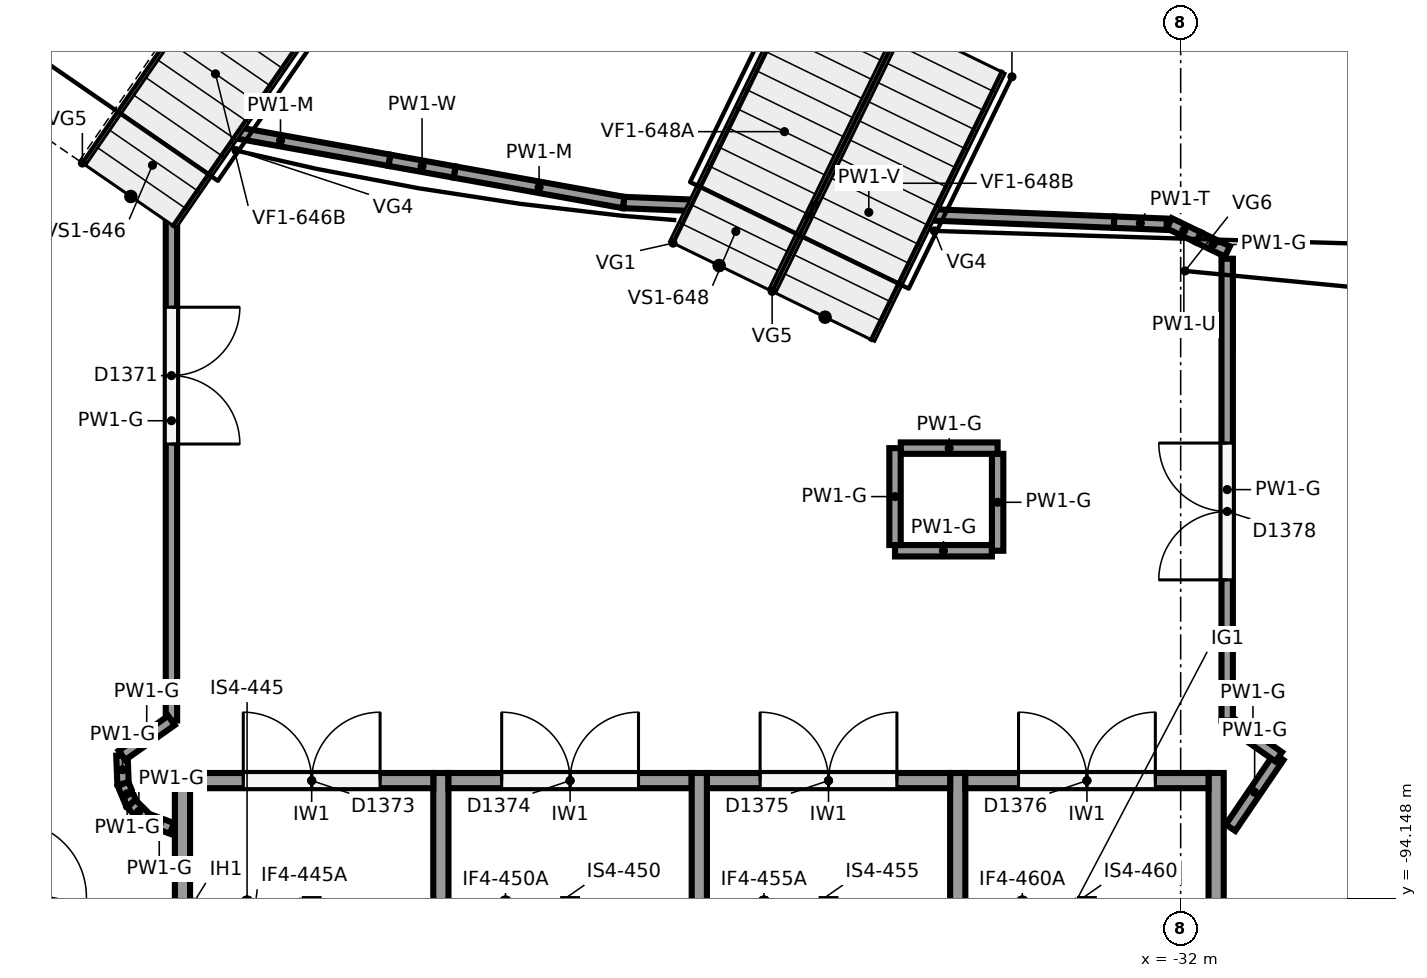
"""IFC4 building model, lengths in metres.
Left out: names, types, materials, properties, quantities, classifications, styles, units other than length and angle.
Written with IfcOpenShell. Run it as: python <this file> out.ifc"""

import sys

from ifc_helpers import new_model, si_unit, direction, frame, frame_2d, origin, origin_2d, place, context, subcontext, project, spatial, rectangle, circle, extrude, element, fill, save


model = new_model("IFC4")
c1 = context("Model", 3, precision=1e-05, world=origin(), true_north=direction((0.0, 1.0)))
c2 = subcontext(c1, "Body", "Model", "MODEL_VIEW")
j1 = project(units=[si_unit("LENGTHUNIT", "METRE"), si_unit("PLANEANGLEUNIT", "RADIAN")], contexts=[c1])
p1 = place(None, origin())
s1 = spatial("IfcSite", under=j1, at=p1, CompositionType="ELEMENT")
p2 = place(p1, origin())
s2 = spatial("IfcBuilding", under=s1, at=p2, CompositionType="ELEMENT")
p3 = place(p2, frame((0.0, 0.0, 18.0)))
s3 = spatial("IfcBuildingStorey", under=s2, at=p3, CompositionType="ELEMENT", Elevation=18.0)
p4 = place(p3, frame((-42.016, -84.707, 0.0), z_axis=(0.0, 0.0, 1.0), x_axis=(1.0, 0.0, 0.0)))
e1 = element("IfcColumn", 1, at=p4, inside=s3, PredefinedType="COLUMN", context=c2, shape_type="SweptSolid", body=[
    extrude(circle(Radius=0.4, at=origin_2d()), origin(), (0.0, 0.0, 1.0), 4.807),
])
p5 = place(p3, frame((-46.333, -90.126, 0.0), z_axis=(0.0, 0.0, 1.0), x_axis=(1.0, 0.0, 0.0)))
e2 = element("IfcColumn", 2, at=p5, inside=s3, PredefinedType="COLUMN", context=c2, shape_type="SweptSolid", body=[
    extrude(circle(Radius=0.45, at=origin_2d()), origin(), (0.0, 0.0, 1.0), 6.0),
])
p6 = place(p3, frame((-31.737, -85.377, 0.0), z_axis=(0.0, 0.0, 1.0), x_axis=(1.0, 0.0, 0.0)))
e3 = element("IfcColumn", 3, at=p6, inside=s3, PredefinedType="COLUMN", context=c2, shape_type="SweptSolid", body=[
    extrude(circle(Radius=0.4, at=origin_2d()), origin(), (0.0, 0.0, 1.0), 4.687),
])
p7 = place(p3, frame((-32.944, -90.551, 0.0), z_axis=(0.0, 0.0, 1.0), x_axis=(1.0, 0.0, 0.0)))
e4 = element("IfcColumn", 4, at=p7, inside=s3, PredefinedType="COLUMN", context=c2, shape_type="SweptSolid", body=[
    extrude(circle(Radius=0.55, at=origin_2d()), origin(), (0.0, 0.0, 1.0), 6.0),
])
for number, where, z_axis, x_axis in (
    (5, (-45.133, -101.6, 0.0), (0.0, 0.0, 1.0), (0.0, 1.0, 0.0)),
    (6, (-38.333, -101.6, 0.0), (0.0, 0.0, 1.0), (0.0, 1.0, 0.0)),
    (7, (-31.533, -101.6, 0.0), (0.0, 0.0, 1.0), (0.0, 1.0, 0.0)),
    (8, (-41.733, -101.6, 0.0), (0.0, 0.0, 1.0), (0.0, 1.0, 0.0)),
    (9, (-34.933, -101.6, 0.0), (0.0, 0.0, 1.0), (0.0, 1.0, 0.0)),
):
    element("IfcWall", number, at=place(p3, frame(where, z_axis=z_axis, x_axis=x_axis)), inside=s3, PredefinedType="SHEAR", context=c2, shape_type="SweptSolid", body=[
        extrude(rectangle(XDim=9.1, YDim=0.2, at=frame_2d((4.55, 0.0))), origin(), (0.0, 0.0, 1.0), 5.6),
    ])
p8 = place(p3, frame((-45.033, -92.6, 0.0), z_axis=(0.0, 0.0, 1.0), x_axis=(1.0, 0.0, 0.0)))
e10 = element("IfcWall", 10, at=p8, inside=s3, PredefinedType="SHEAR", context=c2, shape_type="SweptSolid", body=[
    extrude(rectangle(XDim=3.2, YDim=0.2, at=frame_2d((1.6, 0.0))), origin(), (0.0, 0.0, 1.0), 5.6),
])
p9 = place(p8, frame((0.7, 0.0, 0.0)))
e11 = element("IfcOpeningElement", 11, at=p9, cuts=e10, PredefinedType="OPENING", context=c2, shape_type="SweptSolid", body=[
    extrude(rectangle(XDim=1.8, YDim=2.1, at=frame_2d((0.9, 1.05))), frame((0.0, 0.11, 0.0), z_axis=(0.0, -1.0, 0.0), x_axis=(1.0, 0.0, 0.0)), (0.0, 0.0, 1.0), 0.22),
])
p10 = place(p3, frame((-41.633, -92.6, 0.0), z_axis=(0.0, 0.0, 1.0), x_axis=(1.0, 0.0, 0.0)))
e12 = element("IfcWall", 12, at=p10, inside=s3, PredefinedType="SHEAR", context=c2, shape_type="SweptSolid", body=[
    extrude(rectangle(XDim=3.2, YDim=0.2, at=frame_2d((1.6, 0.0))), origin(), (0.0, 0.0, 1.0), 5.6),
])
p11 = place(p10, frame((0.7, 0.0, 0.0)))
e13 = element("IfcOpeningElement", 13, at=p11, cuts=e12, PredefinedType="OPENING", context=c2, shape_type="SweptSolid", body=[
    extrude(rectangle(XDim=1.8, YDim=2.1, at=frame_2d((0.9, 1.05))), frame((0.0, 0.11, 0.0), z_axis=(0.0, -1.0, 0.0), x_axis=(1.0, 0.0, 0.0)), (0.0, 0.0, 1.0), 0.22),
])
p12 = place(p3, frame((-38.233, -92.6, 0.0), z_axis=(0.0, 0.0, 1.0), x_axis=(1.0, 0.0, 0.0)))
e14 = element("IfcWall", 14, at=p12, inside=s3, PredefinedType="SHEAR", context=c2, shape_type="SweptSolid", body=[
    extrude(rectangle(XDim=3.2, YDim=0.2, at=frame_2d((1.6, 0.0))), origin(), (0.0, 0.0, 1.0), 5.6),
])
p13 = place(p12, frame((0.7, 0.0, 0.0)))
e15 = element("IfcOpeningElement", 15, at=p13, cuts=e14, PredefinedType="OPENING", context=c2, shape_type="SweptSolid", body=[
    extrude(rectangle(XDim=1.8, YDim=2.1, at=frame_2d((0.9, 1.05))), frame((0.0, 0.11, 0.0), z_axis=(0.0, -1.0, 0.0), x_axis=(1.0, 0.0, 0.0)), (0.0, 0.0, 1.0), 0.22),
])
p14 = place(p3, frame((-34.833, -92.6, 0.0), z_axis=(0.0, 0.0, 1.0), x_axis=(1.0, 0.0, 0.0)))
e16 = element("IfcWall", 16, at=p14, inside=s3, PredefinedType="SHEAR", context=c2, shape_type="SweptSolid", body=[
    extrude(rectangle(XDim=3.2, YDim=0.2, at=frame_2d((1.6, 0.0))), origin(), (0.0, 0.0, 1.0), 5.6),
])
p15 = place(p14, frame((0.7, 0.0, 0.0)))
e17 = element("IfcOpeningElement", 17, at=p15, cuts=e16, PredefinedType="OPENING", context=c2, shape_type="SweptSolid", body=[
    extrude(rectangle(XDim=1.8, YDim=2.1, at=frame_2d((0.9, 1.05))), frame((0.0, 0.11, 0.0), z_axis=(0.0, -1.0, 0.0), x_axis=(1.0, 0.0, 0.0)), (0.0, 0.0, 1.0), 0.22),
])
p16 = place(p3, frame((-35.758, -89.576, 0.0), z_axis=(0.0, 0.0, 1.0), x_axis=(1.0, 0.0, 0.0)))
e18 = element("IfcWall", 18, at=p16, inside=s3, PredefinedType="PARTITIONING", context=c2, shape_type="SweptSolid", body=[
    extrude(rectangle(XDim=1.275, YDim=0.15, at=frame_2d((0.637, 0.0))), origin(), (0.0, 0.0, 1.0), 2.667),
])
for number, where, z_axis, x_axis in (
    (19, (-34.408, -89.576, 0.0), (0.0, 0.0, 1.0), (0.0, 1.0, 0.0)),
    (20, (-34.408, -88.226, 0.0), (0.0, 0.0, 1.0), (-1.0, 0.0, 0.0)),
    (21, (-35.758, -88.226, 0.0), (0.0, 0.0, 1.0), (0.0, -1.0, 0.0)),
):
    element("IfcWall", number, at=place(p3, frame(where, z_axis=z_axis, x_axis=x_axis)), inside=s3, PredefinedType="PARTITIONING", context=c2, shape_type="SweptSolid", body=[
        extrude(rectangle(XDim=1.275, YDim=0.15, at=frame_2d((0.638, 0.0))), origin(), (0.0, 0.0, 1.0), 2.667),
    ])
p17 = place(p3, frame((-45.93, -92.269, 0.0), z_axis=(0.0, 0.0, 1.0), x_axis=(0.039083544188, -0.999235946398, 0.0)))
e22 = element("IfcWall", 22, at=p17, inside=s3, PredefinedType="PARTITIONING", context=c2, shape_type="SweptSolid", body=[
    extrude(rectangle(XDim=0.375, YDim=0.15, at=frame_2d((0.188, 0.0))), origin(), (0.0, 0.0, 1.0), 2.667),
])
p18 = place(p3, frame((-45.915, -92.643, 0.0), z_axis=(0.0, 0.0, 1.0), x_axis=(0.382275228123, -0.924048510611, 0.0)))
e23 = element("IfcWall", 23, at=p18, inside=s3, PredefinedType="PARTITIONING", context=c2, shape_type="SweptSolid", body=[
    extrude(rectangle(XDim=0.282, YDim=0.15, at=frame_2d((0.141, 0.0))), origin(), (0.0, 0.0, 1.0), 2.667),
])
p19 = place(p3, frame((-45.808, -92.904, 0.0), z_axis=(0.0, 0.0, 1.0), x_axis=(0.707534941396, -0.706678361564, 0.0)))
e24 = element("IfcWall", 24, at=p19, inside=s3, PredefinedType="PARTITIONING", context=c2, shape_type="SweptSolid", body=[
    extrude(rectangle(XDim=0.285, YDim=0.15, at=frame_2d((0.143, 0.0))), origin(), (0.0, 0.0, 1.0), 2.667),
])
p20 = place(p3, frame((-45.606, -93.105, 0.0), z_axis=(0.0, 0.0, 1.0), x_axis=(0.937757023355, -0.347292045903, 0.0)))
e25 = element("IfcWall", 25, at=p20, inside=s3, PredefinedType="PARTITIONING", context=c2, shape_type="SweptSolid", body=[
    extrude(rectangle(XDim=0.356, YDim=0.15, at=frame_2d((0.178, 0.0))), origin(), (0.0, 0.0, 1.0), 2.667),
])
p21 = place(p3, frame((-31.344, -93.22, 0.0), z_axis=(0.0, 0.0, 1.0), x_axis=(0.562422564308, 0.826849961697, 0.0)))
e26 = element("IfcWall", 26, at=p21, inside=s3, PredefinedType="PARTITIONING", context=c2, shape_type="SweptSolid", body=[
    extrude(rectangle(XDim=1.127, YDim=0.15, at=frame_2d((0.564, 0.0))), origin(), (0.0, 0.0, 1.0), 2.667),
])
p22 = place(p3, frame((-30.71, -92.288, 0.0), z_axis=(0.0, 0.0, 1.0), x_axis=(-0.817334487726, 0.5761634622, 0.0)))
e27 = element("IfcWall", 27, at=p22, inside=s3, PredefinedType="PARTITIONING", context=c2, shape_type="SweptSolid", body=[
    extrude(rectangle(XDim=0.83, YDim=0.15, at=frame_2d((0.415, 0.0))), origin(), (0.0, 0.0, 1.0), 2.667),
])
p23 = place(p3, frame((-31.388, -91.809, 0.0), z_axis=(0.0, 0.0, 1.0), x_axis=(8.037293e-05, 0.99999999677, 0.0)))
e28 = element("IfcWall", 28, at=p23, inside=s3, PredefinedType="PARTITIONING", context=c2, shape_type="SweptSolid", body=[
    extrude(rectangle(XDim=6.075, YDim=0.15, at=frame_2d((3.038, 0.0))), origin(), (0.0, 0.0, 1.0), 2.667),
])
p24 = place(p23, frame((1.85, 0.0, 0.0)))
e29 = element("IfcOpeningElement", 29, at=p24, cuts=e28, PredefinedType="OPENING", context=c2, shape_type="SweptSolid", body=[
    extrude(rectangle(XDim=1.8, YDim=2.1, at=frame_2d((0.9, 1.05))), frame((0.0, 0.085, 0.0), z_axis=(0.0, -1.0, 0.0), x_axis=(1.0, 0.0, 0.0)), (0.0, 0.0, 1.0), 0.17),
])
p25 = place(p3, frame((-32.184, -85.281, 0.0), z_axis=(0.0, 0.0, 1.0), x_axis=(-0.999194762281, 0.040122649842, 0.0)))
e30 = element("IfcWall", 30, at=p25, inside=s3, PredefinedType="PARTITIONING", context=c2, shape_type="SweptSolid", body=[
    extrude(rectangle(XDim=0.694, YDim=0.15, at=frame_2d((0.347, 0.0))), origin(), (0.0, 0.0, 1.0), 2.257),
])
p26 = place(p3, frame((-32.877, -85.253, 0.0), z_axis=(0.0, 0.0, 1.0), x_axis=(-0.999199750422, 0.039998234429, 0.0)))
e31 = element("IfcWall", 31, at=p26, inside=s3, PredefinedType="PARTITIONING", context=c2, shape_type="SweptSolid", body=[
    extrude(rectangle(XDim=6.458, YDim=0.15, at=frame_2d((3.229, 0.0))), origin(), (0.0, 0.0, 1.0), 2.506),
])
p27 = place(p3, frame((-39.33, -84.995, 0.0), z_axis=(0.0, 0.0, 1.0), x_axis=(-0.984135059847, 0.177420923174, 0.0)))
e32 = element("IfcWall", 32, at=p27, inside=s3, PredefinedType="PARTITIONING", context=c2, shape_type="SweptSolid", body=[
    extrude(rectangle(XDim=2.26, YDim=0.15, at=frame_2d((1.13, 0.0))), origin(), (0.0, 0.0, 1.0), 2.581),
])
p28 = place(p3, frame((-42.409, -84.44, 0.0), z_axis=(0.0, 0.0, 1.0), x_axis=(-0.984120784208, 0.177500090396, 0.0)))
e33 = element("IfcWall", 33, at=p28, inside=s3, PredefinedType="PARTITIONING", context=c2, shape_type="SweptSolid", body=[
    extrude(rectangle(XDim=2.916, YDim=0.15, at=frame_2d((1.458, 0.0))), origin(), (0.0, 0.0, 1.0), 2.581),
])
p29 = place(p3, frame((-45.278, -83.922, 0.0), z_axis=(0.0, 0.0, 1.0), x_axis=(0.0, -1.0, 0.0)))
e34 = element("IfcWall", 34, at=p29, inside=s3, PredefinedType="PARTITIONING", context=c2, shape_type="SweptSolid", body=[
    extrude(rectangle(XDim=7.887, YDim=0.15, at=frame_2d((3.944, 0.0))), origin(), (0.0, 0.0, 1.0), 2.667),
])
p30 = place(p29, frame((2.45, 0.0, 0.0)))
e35 = element("IfcOpeningElement", 35, at=p30, cuts=e34, PredefinedType="OPENING", context=c2, shape_type="SweptSolid", body=[
    extrude(rectangle(XDim=1.8, YDim=2.1, at=frame_2d((0.9, 1.05))), frame((0.0, 0.085, 0.0), z_axis=(0.0, -1.0, 0.0), x_axis=(1.0, 0.0, 0.0)), (0.0, 0.0, 1.0), 0.17),
])
p31 = place(p3, frame((-45.278, -91.809, 0.0), z_axis=(0.0, 0.0, 1.0), x_axis=(-0.817672741853, -0.575683322002, 0.0)))
e36 = element("IfcWall", 36, at=p31, inside=s3, PredefinedType="PARTITIONING", context=c2, shape_type="SweptSolid", body=[
    extrude(rectangle(XDim=0.796, YDim=0.15, at=frame_2d((0.398, 0.0))), origin(), (0.0, 0.0, 1.0), 2.667),
])
p32 = place(p3, frame((-31.385, -85.638, 0.0), z_axis=(0.0, 0.0, 1.0), x_axis=(-0.900217444271, 0.435440642373, 0.0)))
e37 = element("IfcWall", 37, at=p32, inside=s3, PredefinedType="PARTITIONING", context=c2, shape_type="SweptSolid", body=[
    extrude(rectangle(XDim=0.424, YDim=0.15, at=frame_2d((0.212, 0.0))), origin(), (0.0, 0.0, 1.0), 2.667),
])
p33 = place(p3, frame((-31.767, -85.454, 0.0), z_axis=(0.0, 0.0, 1.0), x_axis=(-0.899991899384, 0.435906619638, 0.0)))
e38 = element("IfcWall", 38, at=p33, inside=s3, PredefinedType="PARTITIONING", context=c2, shape_type="SweptSolid", body=[
    extrude(rectangle(XDim=0.425, YDim=0.15, at=frame_2d((0.212, 0.0))), origin(), (0.0, 0.0, 1.0), 2.316),
])
p34 = place(p3, frame((-41.553, -84.594, 0.0), z_axis=(0.0, 0.0, 1.0), x_axis=(-0.984120583858, 0.177501201198, 0.0)))
e39 = element("IfcWall", 39, at=p34, inside=s3, PredefinedType="PARTITIONING", context=c2, shape_type="SweptSolid", body=[
    extrude(rectangle(XDim=0.869, YDim=0.15, at=frame_2d((0.435, 0.0))), origin(), (0.0, 0.0, 1.0), 2.556),
])
p35 = place(p3, frame((-47.593, -94.091, 0.0), z_axis=(0.0, 0.0, 1.0), x_axis=(0.9794722351, -0.201579117639, 0.0)))
e40 = element("IfcWall", 40, at=p35, inside=s3, PredefinedType="PARTITIONING", context=c2, shape_type="SweptSolid", body=[
    extrude(rectangle(XDim=1.4, YDim=0.15, at=frame_2d((0.7, 0.0))), origin(), (0.0, 0.0, 1.0), 5.6),
])
p36 = place(p35, frame((0.2, 0.0, 0.0)))
e41 = element("IfcOpeningElement", 41, at=p36, cuts=e40, PredefinedType="OPENING", context=c2, shape_type="SweptSolid", body=[
    extrude(rectangle(XDim=1.0, YDim=2.1, at=frame_2d((0.5, 1.05))), frame((0.0, 0.085, 0.0), z_axis=(0.0, -1.0, 0.0), x_axis=(1.0, 0.0, 0.0)), (0.0, 0.0, 1.0), 0.17),
])
p37 = place(p9, origin())
e42 = element("IfcDoor", 42, at=p37, inside=s3, OperationType="DOUBLE_DOOR_SINGLE_SWING", PredefinedType="DOOR", context=c2, shape_type="SweptSolid", body=[
    extrude(rectangle(XDim=1.8, YDim=2.1, at=frame_2d((0.9, 1.05))), frame((0.0, 0.025, 0.0), z_axis=(0.0, -1.0, 0.0), x_axis=(1.0, 0.0, 0.0)), (0.0, 0.0, 1.0), 0.05),
])
fill(e11, e42)
p38 = place(p11, origin())
e43 = element("IfcDoor", 43, at=p38, inside=s3, OperationType="DOUBLE_DOOR_SINGLE_SWING", PredefinedType="DOOR", context=c2, shape_type="SweptSolid", body=[
    extrude(rectangle(XDim=1.8, YDim=2.1, at=frame_2d((0.9, 1.05))), frame((0.0, 0.025, 0.0), z_axis=(0.0, -1.0, 0.0), x_axis=(1.0, 0.0, 0.0)), (0.0, 0.0, 1.0), 0.05),
])
fill(e13, e43)
p39 = place(p13, origin())
e44 = element("IfcDoor", 44, at=p39, inside=s3, OperationType="DOUBLE_DOOR_SINGLE_SWING", PredefinedType="DOOR", context=c2, shape_type="SweptSolid", body=[
    extrude(rectangle(XDim=1.8, YDim=2.1, at=frame_2d((0.9, 1.05))), frame((0.0, 0.025, 0.0), z_axis=(0.0, -1.0, 0.0), x_axis=(1.0, 0.0, 0.0)), (0.0, 0.0, 1.0), 0.05),
])
fill(e15, e44)
p40 = place(p15, origin())
e45 = element("IfcDoor", 45, at=p40, inside=s3, OperationType="DOUBLE_DOOR_SINGLE_SWING", PredefinedType="DOOR", context=c2, shape_type="SweptSolid", body=[
    extrude(rectangle(XDim=1.8, YDim=2.1, at=frame_2d((0.9, 1.05))), frame((0.0, 0.025, 0.0), z_axis=(0.0, -1.0, 0.0), x_axis=(1.0, 0.0, 0.0)), (0.0, 0.0, 1.0), 0.05),
])
fill(e17, e45)
p41 = place(p30, origin())
e46 = element("IfcDoor", 46, at=p41, inside=s3, OperationType="DOUBLE_DOOR_SINGLE_SWING", PredefinedType="DOOR", context=c2, shape_type="SweptSolid", body=[
    extrude(rectangle(XDim=1.8, YDim=2.1, at=frame_2d((0.9, 1.05))), frame((0.0, 0.025, 0.0), z_axis=(0.0, -1.0, 0.0), x_axis=(1.0, 0.0, 0.0)), (0.0, 0.0, 1.0), 0.05),
])
fill(e35, e46)
p42 = place(p24, origin())
e47 = element("IfcDoor", 47, at=p42, inside=s3, OperationType="DOUBLE_DOOR_SINGLE_SWING", PredefinedType="DOOR", context=c2, shape_type="SweptSolid", body=[
    extrude(rectangle(XDim=1.8, YDim=2.1, at=frame_2d((0.9, 1.05))), frame((0.0, 0.025, 0.0), z_axis=(0.0, -1.0, 0.0), x_axis=(1.0, 0.0, 0.0)), (0.0, 0.0, 1.0), 0.05),
])
fill(e29, e47)
p43 = place(p36, origin())
e48 = element("IfcDoor", 48, at=p43, inside=s3, OperationType="SINGLE_SWING_LEFT", PredefinedType="DOOR", context=c2, shape_type="SweptSolid", body=[
    extrude(rectangle(XDim=1.0, YDim=2.1, at=frame_2d((0.5, 1.05))), frame((0.0, 0.025, 0.0), z_axis=(0.0, -1.0, 0.0), x_axis=(1.0, 0.0, 0.0)), (0.0, 0.0, 1.0), 0.05),
])
fill(e41, e48)
save(model, sys.argv[1])
